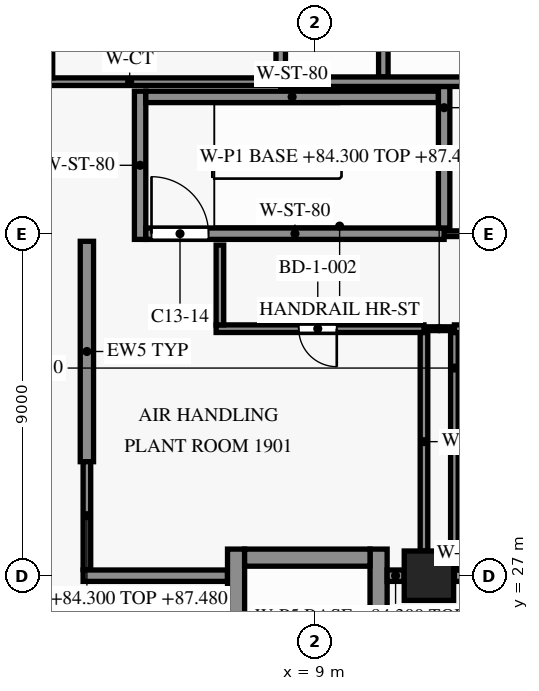
"""IFC4 building model, lengths in metres.
Left out: names, types, materials, properties, quantities, classifications, styles, units other than length and angle.
Written with IfcOpenShell. Run it as: python <this file> out.ifc"""

import sys

from ifc_helpers import new_model, si_unit, direction, frame, frame_2d, origin, origin_2d, place, context, subcontext, project, spatial, rectangle, extrude, element, fill, save


model = new_model("IFC4")
c1 = context("Model", 3, precision=1e-05, world=origin(), true_north=direction((0.0, 1.0)))
c2 = subcontext(c1, "Body", "Model", "MODEL_VIEW")
j1 = project(units=[si_unit("LENGTHUNIT", "METRE"), si_unit("PLANEANGLEUNIT", "RADIAN")], contexts=[c1])
p1 = place(None, origin())
s1 = spatial("IfcSite", under=j1, at=p1, CompositionType="ELEMENT")
p2 = place(p1, origin())
s2 = spatial("IfcBuilding", under=s1, at=p2, CompositionType="ELEMENT")
p3 = place(p2, frame((0.0, 0.0, 84.3)))
s3 = spatial("IfcBuildingStorey", under=s2, at=p3, CompositionType="ELEMENT", Elevation=84.3)
p4 = place(p3, frame((12.0, 27.0, 0.0), z_axis=(0.0, 0.0, 1.0), x_axis=(1.0, 0.0, 0.0)))
e1 = element("IfcColumn", 1, at=p4, inside=s3, PredefinedType="COLUMN", context=c2, shape_type="SweptSolid", body=[
    extrude(rectangle(XDim=1.3, YDim=1.3, at=origin_2d()), origin(), (0.0, 0.0, 1.0), 4.2),
])
p5 = place(p3, frame((3.0, 30.0, 0.0), z_axis=(0.0, 0.0, 1.0), x_axis=(0.0, 1.0, 0.0)))
e2 = element("IfcWall", 2, at=p5, inside=s3, PredefinedType="SOLIDWALL", context=c2, shape_type="SweptSolid", body=[
    extrude(rectangle(XDim=5.8, YDim=0.35, at=frame_2d((2.9, 0.0))), origin(), (0.0, 0.0, 1.0), 3.7),
])
p6 = place(p3, frame((7.15, 27.475, 0.0), z_axis=(0.0, 0.0, 1.0), x_axis=(1.0, 0.0, 0.0)))
e3 = element("IfcWall", 3, at=p6, inside=s3, PredefinedType="SHEAR", context=c2, shape_type="SweptSolid", body=[
    extrude(rectangle(XDim=3.3, YDim=0.45, at=frame_2d((1.65, 0.0))), origin(), (0.0, 0.0, 1.0), 3.9),
])
p7 = place(p3, frame((12.4, 36.0, 0.0), z_axis=(0.0, 0.0, 1.0), x_axis=(1.0, 0.0, 0.0)))
e4 = element("IfcWall", 4, at=p7, inside=s3, PredefinedType="SHEAR", context=c2, shape_type="SweptSolid", body=[
    extrude(rectangle(XDim=11.825, YDim=0.15, at=frame_2d((5.913, 0.0))), origin(), (0.0, 0.0, 1.0), 3.9),
])
p8 = place(p7, frame((1.05, 0.0, 0.0)))
e5 = element("IfcOpeningElement", 5, at=p8, cuts=e4, PredefinedType="OPENING", context=c2, shape_type="SweptSolid", body=[
    extrude(rectangle(XDim=0.9, YDim=2.1, at=frame_2d((0.45, 1.05))), frame((0.0, 0.085, 0.0), z_axis=(0.0, -1.0, 0.0), x_axis=(1.0, 0.0, 0.0)), (0.0, 0.0, 1.0), 0.17),
])
p9 = place(p7, frame((4.275, 0.0, 0.0)))
e6 = element("IfcOpeningElement", 6, at=p9, cuts=e4, PredefinedType="OPENING", context=c2, shape_type="SweptSolid", body=[
    extrude(rectangle(XDim=0.95, YDim=2.1, at=frame_2d((0.475, 1.05))), frame((0.0, 0.085, 0.0), z_axis=(0.0, -1.0, 0.0), x_axis=(1.0, 0.0, 0.0)), (0.0, 0.0, 1.0), 0.17),
])
p10 = place(p7, frame((8.75, 0.0, 0.0)))
e7 = element("IfcOpeningElement", 7, at=p10, cuts=e4, PredefinedType="OPENING", context=c2, shape_type="SweptSolid", body=[
    extrude(rectangle(XDim=0.9, YDim=2.1, at=frame_2d((0.45, 1.05))), frame((0.0, 0.085, 0.0), z_axis=(0.0, -1.0, 0.0), x_axis=(1.0, 0.0, 0.0)), (0.0, 0.0, 1.0), 0.17),
])
p11 = place(p3, frame((4.55, 36.0, 0.0), z_axis=(0.0, 0.0, 1.0), x_axis=(1.0, 0.0, 0.0)))
e8 = element("IfcWall", 8, at=p11, inside=s3, PredefinedType="SHEAR", context=c2, shape_type="SweptSolid", body=[
    extrude(rectangle(XDim=7.85, YDim=0.3, at=frame_2d((3.925, 0.0))), origin(), (0.0, 0.0, 1.0), 3.9),
])
p12 = place(p11, frame((0.15, 0.0, 0.0)))
e9 = element("IfcOpeningElement", 9, at=p12, cuts=e8, PredefinedType="OPENING", context=c2, shape_type="SweptSolid", body=[
    extrude(rectangle(XDim=1.5, YDim=2.2, at=frame_2d((0.75, 1.1))), frame((0.0, 0.16, 0.0), z_axis=(0.0, -1.0, 0.0), x_axis=(1.0, 0.0, 0.0)), (0.0, 0.0, 1.0), 0.32),
])
p13 = place(p3, frame((4.55, 39.6, 0.0), z_axis=(0.0, 0.0, 1.0), x_axis=(1.0, 0.0, 0.0)))
e10 = element("IfcWall", 10, at=p13, inside=s3, PredefinedType="SHEAR", context=c2, shape_type="SweptSolid", body=[
    extrude(rectangle(XDim=7.7, YDim=0.3, at=frame_2d((3.85, 0.0))), origin(), (0.0, 0.0, 1.0), 3.9),
])
p14 = place(p3, frame((0.15, 40.0, 0.0), z_axis=(0.0, 0.0, 1.0), x_axis=(1.0, 0.0, 0.0)))
e11 = element("IfcWall", 11, at=p14, inside=s3, PredefinedType="PARTITIONING", context=c2, shape_type="SweptSolid", body=[
    extrude(rectangle(XDim=7.95, YDim=0.2, at=frame_2d((3.975, 0.0))), origin(), (0.0, 0.0, 1.0), 3.9),
])
p15 = place(p3, frame((8.1, 40.0, 0.0), z_axis=(0.0, 0.0, 1.0), x_axis=(1.0, 0.0, 0.0)))
e12 = element("IfcWall", 12, at=p15, inside=s3, PredefinedType="SHEAR", context=c2, shape_type="SweptSolid", body=[
    extrude(rectangle(XDim=16.075, YDim=0.25, at=frame_2d((8.038, 0.0))), origin(), (0.0, 0.0, 1.0), 3.9),
])
p16 = place(p3, frame((2.0, 40.1, 0.0), z_axis=(0.0, 0.0, 1.0), x_axis=(0.0, 1.0, 0.0)))
e13 = element("IfcWall", 13, at=p16, inside=s3, PredefinedType="PARTITIONING", context=c2, shape_type="SweptSolid", body=[
    extrude(rectangle(XDim=3.0, YDim=0.2, at=frame_2d((1.5, 0.0))), origin(), (0.0, 0.0, 1.0), 3.9),
])
p17 = place(p3, frame((4.4, 35.85, 0.0), z_axis=(0.0, 0.0, 1.0), x_axis=(0.0, 1.0, 0.0)))
e14 = element("IfcWall", 14, at=p17, inside=s3, PredefinedType="SHEAR", context=c2, shape_type="SweptSolid", body=[
    extrude(rectangle(XDim=3.9, YDim=0.3, at=frame_2d((1.95, 0.0))), origin(), (0.0, 0.0, 1.0), 3.9),
])
p18 = place(p3, frame((6.925, 19.1, 0.0), z_axis=(0.0, 0.0, 1.0), x_axis=(0.0, 1.0, 0.0)))
e15 = element("IfcWall", 15, at=p18, inside=s3, PredefinedType="SHEAR", context=c2, shape_type="SweptSolid", body=[
    extrude(rectangle(XDim=8.6, YDim=0.45, at=frame_2d((4.3, 0.0))), origin(), (0.0, 0.0, 1.0), 3.9),
])
p19 = place(p3, frame((8.1, 40.125, 0.0), z_axis=(0.0, 0.0, 1.0), x_axis=(0.0, 1.0, 0.0)))
e16 = element("IfcWall", 16, at=p19, inside=s3, PredefinedType="SHEAR", context=c2, shape_type="SweptSolid", body=[
    extrude(rectangle(XDim=2.95, YDim=0.25, at=frame_2d((1.475, 0.0))), origin(), (0.0, 0.0, 1.0), 3.9),
])
p20 = place(p3, frame((10.675, 19.1, 0.0), z_axis=(0.0, 0.0, 1.0), x_axis=(0.0, 1.0, 0.0)))
e17 = element("IfcWall", 17, at=p20, inside=s3, PredefinedType="SHEAR", context=c2, shape_type="SweptSolid", body=[
    extrude(rectangle(XDim=8.6, YDim=0.45, at=frame_2d((4.3, 0.0))), origin(), (0.0, 0.0, 1.0), 3.9),
])
p21 = place(p20, frame((0.7, 0.0, 0.0)))
e18 = element("IfcOpeningElement", 18, at=p21, cuts=e17, PredefinedType="OPENING", context=c2, shape_type="SweptSolid", body=[
    extrude(rectangle(XDim=1.2, YDim=2.2, at=frame_2d((0.6, 1.1))), frame((0.0, 0.235, 0.0), z_axis=(0.0, -1.0, 0.0), x_axis=(1.0, 0.0, 0.0)), (0.0, 0.0, 1.0), 0.47),
])
p22 = place(p3, frame((10.8, 40.125, 0.0), z_axis=(0.0, 0.0, 1.0), x_axis=(0.0, 1.0, 0.0)))
e19 = element("IfcWall", 19, at=p22, inside=s3, PredefinedType="SHEAR", context=c2, shape_type="SweptSolid", body=[
    extrude(rectangle(XDim=2.95, YDim=0.25, at=frame_2d((1.475, 0.0))), origin(), (0.0, 0.0, 1.0), 3.9),
])
p23 = place(p3, frame((12.4, 36.15, 0.0), z_axis=(0.0, 0.0, 1.0), x_axis=(0.0, 1.0, 0.0)))
e20 = element("IfcWall", 20, at=p23, inside=s3, PredefinedType="SHEAR", context=c2, shape_type="SweptSolid", body=[
    extrude(rectangle(XDim=3.725, YDim=0.3, at=frame_2d((1.863, 0.0))), origin(), (0.0, 0.0, 1.0), 3.9),
])
p24 = place(p3, frame((6.7, 27.0, 0.0), z_axis=(0.0, 0.0, 1.0), x_axis=(-1.0, 0.0, 0.0)))
e21 = element("IfcWall", 21, at=p24, inside=s3, PredefinedType="PARTITIONING", context=c2, shape_type="SweptSolid", body=[
    extrude(rectangle(XDim=3.8, YDim=0.3, at=frame_2d((1.9, 0.0))), origin(), (0.0, 0.0, 1.0), 3.18),
])
p25 = place(p3, frame((10.9, 27.0, 0.0), z_axis=(0.0, 0.0, 1.0), x_axis=(1.0, 0.0, 0.0)))
e22 = element("IfcWall", 22, at=p25, inside=s3, PredefinedType="PARTITIONING", context=c2, shape_type="SweptSolid", body=[
    extrude(rectangle(XDim=0.445, YDim=0.3, at=frame_2d((0.223, 0.0))), origin(), (0.0, 0.0, 1.0), 3.88),
])
p26 = place(p3, frame((12.67, 27.0, 0.0), z_axis=(0.0, 0.0, 1.0), x_axis=(1.0, 0.0, 0.0)))
e23 = element("IfcWall", 23, at=p26, inside=s3, PredefinedType="PARTITIONING", context=c2, shape_type="SweptSolid", body=[
    extrude(rectangle(XDim=1.33, YDim=0.3, at=frame_2d((0.665, 0.0))), origin(), (0.0, 0.0, 1.0), 3.18),
])
p27 = place(p3, frame((3.0, 27.16, 0.0), z_axis=(0.0, 0.0, 1.0), x_axis=(0.0, 1.0, 0.0)))
e24 = element("IfcWall", 24, at=p27, inside=s3, PredefinedType="PARTITIONING", context=c2, shape_type="SweptSolid", body=[
    extrude(rectangle(XDim=2.84, YDim=0.2, at=frame_2d((1.42, 0.0))), origin(), (0.0, 0.0, 1.0), 3.18),
])
p28 = place(p3, frame((12.67, 27.16, 0.0), z_axis=(0.0, 0.0, 1.0), x_axis=(0.0, 1.0, 0.0)))
e25 = element("IfcWall", 25, at=p28, inside=s3, PredefinedType="PARTITIONING", context=c2, shape_type="SweptSolid", body=[
    extrude(rectangle(XDim=6.24, YDim=0.2, at=frame_2d((3.12, 0.0))), origin(), (0.0, 0.0, 1.0), 3.18),
])
p29 = place(p3, frame((11.87, 33.4, 0.0), z_axis=(0.0, 0.0, 1.0), x_axis=(0.0, -1.0, 0.0)))
e26 = element("IfcWall", 26, at=p29, inside=s3, PredefinedType="PARTITIONING", context=c2, shape_type="SweptSolid", body=[
    extrude(rectangle(XDim=5.745, YDim=0.2, at=frame_2d((2.873, 0.0))), origin(), (0.0, 0.0, 1.0), 3.88),
])
p30 = place(p3, frame((11.87, 33.5, 0.0), z_axis=(0.0, 0.0, 1.0), x_axis=(-1.0, 0.0, 0.0)))
e27 = element("IfcWall", 27, at=p30, inside=s3, PredefinedType="PARTITIONING", context=c2, shape_type="SweptSolid", body=[
    extrude(rectangle(XDim=5.47, YDim=0.2, at=frame_2d((2.735, 0.0))), origin(), (0.0, 0.0, 1.0), 3.88),
])
p31 = place(p30, frame((2.295, 0.0, 0.0)))
e28 = element("IfcOpeningElement", 28, at=p31, cuts=e27, PredefinedType="OPENING", context=c2, shape_type="SweptSolid", body=[
    extrude(rectangle(XDim=1.0, YDim=2.1, at=frame_2d((0.5, 1.05))), frame((0.0, 0.11, 0.0), z_axis=(0.0, -1.0, 0.0), x_axis=(1.0, 0.0, 0.0)), (0.0, 0.0, 1.0), 0.22),
])
p32 = place(p3, frame((12.67, 33.5, 0.0), z_axis=(0.0, 0.0, 1.0), x_axis=(-1.0, 0.0, 0.0)))
e29 = element("IfcWall", 29, at=p32, inside=s3, PredefinedType="PARTITIONING", context=c2, shape_type="SweptSolid", body=[
    extrude(rectangle(XDim=0.8, YDim=0.1, at=frame_2d((0.4, 0.0))), origin(), (0.0, 0.0, 1.0), 3.18),
])
p33 = place(p3, frame((18.0, 33.5, 0.0), z_axis=(0.0, 0.0, 1.0), x_axis=(-1.0, 0.0, 0.0)))
e30 = element("IfcWall", 30, at=p33, inside=s3, PredefinedType="PARTITIONING", context=c2, shape_type="SweptSolid", body=[
    extrude(rectangle(XDim=5.33, YDim=0.2, at=frame_2d((2.665, 0.0))), origin(), (0.0, 0.0, 1.0), 3.88),
])
p34 = place(p3, frame((6.5, 33.6, 0.0), z_axis=(0.0, 0.0, 1.0), x_axis=(0.0, 1.0, 0.0)))
e31 = element("IfcWall", 31, at=p34, inside=s3, PredefinedType="PARTITIONING", context=c2, shape_type="SweptSolid", body=[
    extrude(rectangle(XDim=2.1, YDim=0.2, at=frame_2d((1.05, 0.0))), origin(), (0.0, 0.0, 1.0), 3.88),
])
p35 = place(p12, origin())
e32 = element("IfcDoor", 32, at=p35, inside=s3, OperationType="SINGLE_SWING_RIGHT", PredefinedType="DOOR", context=c2, shape_type="SweptSolid", body=[
    extrude(rectangle(XDim=1.5, YDim=2.2, at=frame_2d((0.75, 1.1))), frame((0.0, 0.025, 0.0), z_axis=(0.0, -1.0, 0.0), x_axis=(1.0, 0.0, 0.0)), (0.0, 0.0, 1.0), 0.05),
])
fill(e9, e32)
p36 = place(p31, origin())
e33 = element("IfcDoor", 33, at=p36, inside=s3, OperationType="SINGLE_SWING_LEFT", PredefinedType="DOOR", context=c2, shape_type="SweptSolid", body=[
    extrude(rectangle(XDim=1.0, YDim=2.1, at=frame_2d((0.5, 1.05))), frame((0.0, 0.025, 0.0), z_axis=(0.0, -1.0, 0.0), x_axis=(1.0, 0.0, 0.0)), (0.0, 0.0, 1.0), 0.05),
])
fill(e28, e33)
save(model, sys.argv[1])
